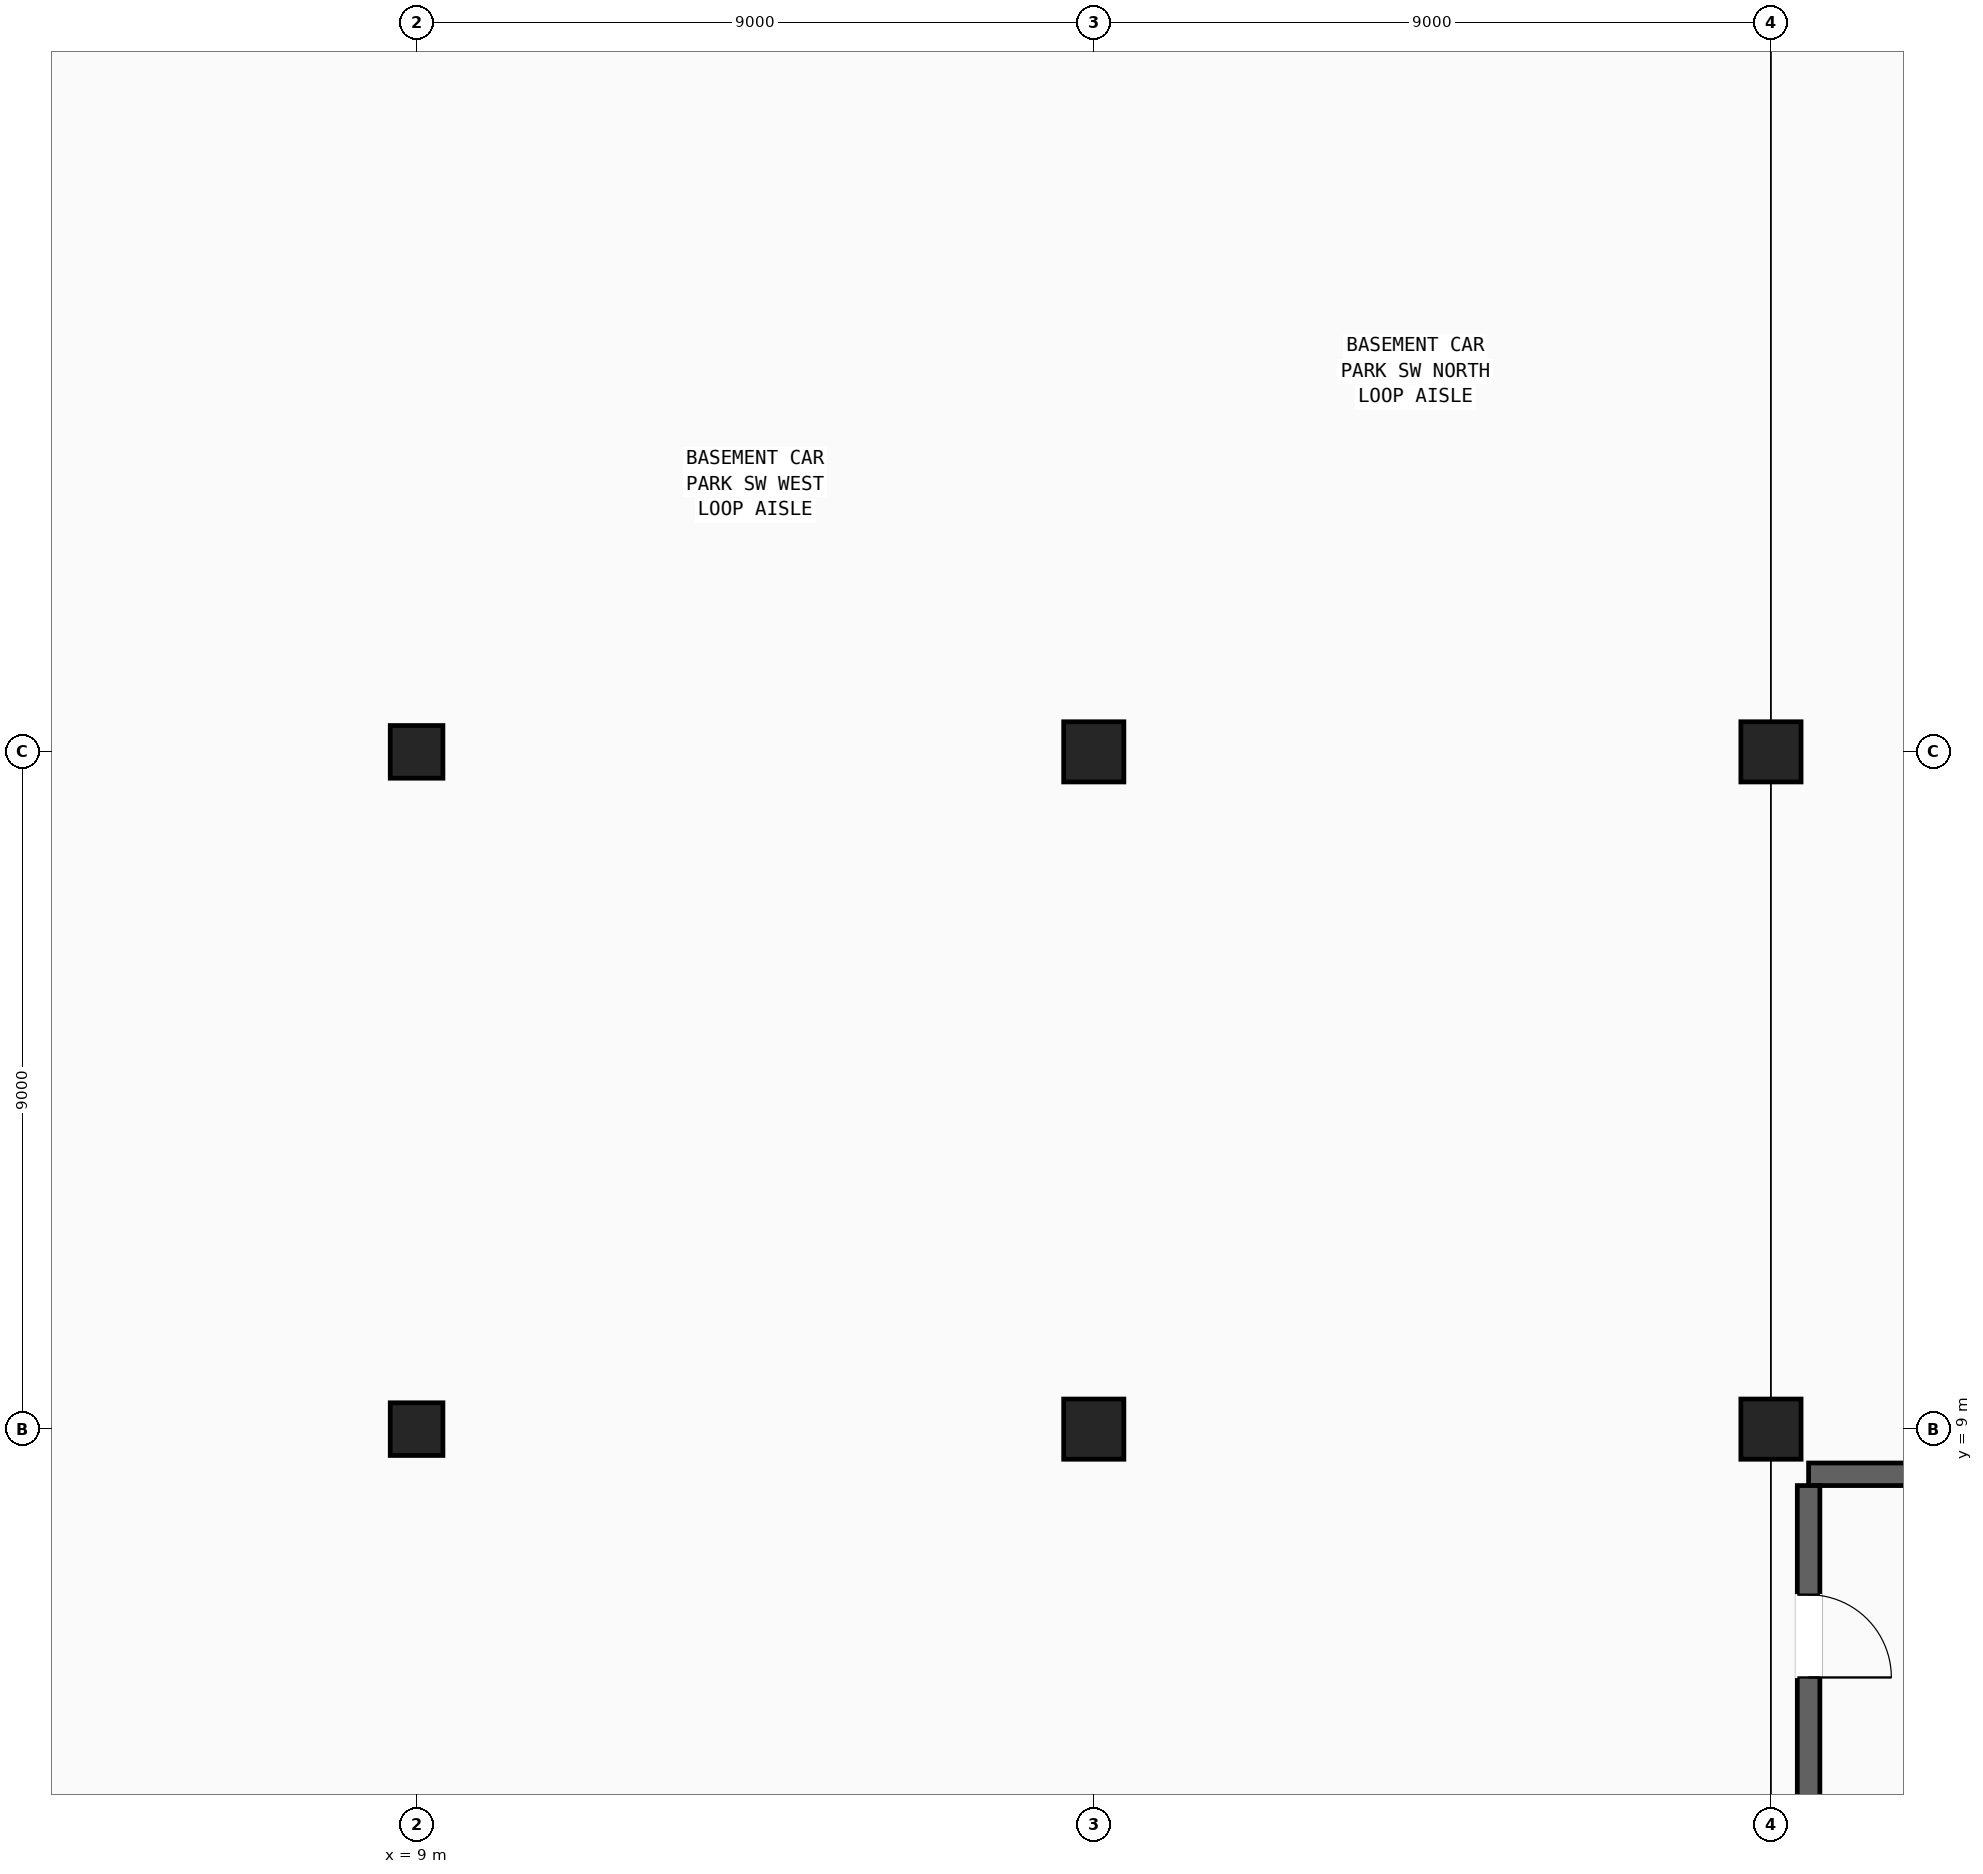
"""IFC4 building model, lengths in metres.
Left out: names, types, materials, properties, quantities, classifications, styles, units other than length and angle.
Written with IfcOpenShell. Run it as: python <this file> out.ifc"""

import sys

from ifc_helpers import new_model, si_unit, direction, frame, frame_2d, origin, origin_2d, place, context, subcontext, project, spatial, rectangle, extrude, element, fill, save


model = new_model("IFC4")
c1 = context("Model", 3, precision=1e-05, world=origin(), true_north=direction((0.0, 1.0)))
c2 = subcontext(c1, "Body", "Model", "MODEL_VIEW")
j1 = project(units=[si_unit("LENGTHUNIT", "METRE"), si_unit("PLANEANGLEUNIT", "RADIAN")], contexts=[c1])
p1 = place(None, origin())
s1 = spatial("IfcSite", under=j1, at=p1, CompositionType="ELEMENT")
p2 = place(p1, origin())
s2 = spatial("IfcBuilding", under=s1, at=p2, CompositionType="ELEMENT")
p3 = place(p2, frame((0.0, 0.0, -5.1)))
s3 = spatial("IfcBuildingStorey", under=s2, at=p3, CompositionType="ELEMENT", Elevation=-5.1)
for number, where, z_axis, x_axis in (
    (1, (9.0, 9.0, 0.0), (0.0, 0.0, 1.0), (1.0, 0.0, 0.0)),
    (2, (9.0, 18.0, 0.0), (0.0, 0.0, 1.0), (1.0, 0.0, 0.0)),
):
    element("IfcColumn", number, at=place(p3, frame(where, z_axis=z_axis, x_axis=x_axis)), inside=s3, PredefinedType="COLUMN", context=c2, shape_type="SweptSolid", body=[
        extrude(rectangle(XDim=0.7, YDim=0.7, at=origin_2d()), origin(), (0.0, 0.0, 1.0), 5.1),
    ])
for number, where, z_axis, x_axis in (
    (3, (18.0, 9.0, 0.0), (0.0, 0.0, 1.0), (1.0, 0.0, 0.0)),
    (4, (18.0, 18.0, 0.0), (0.0, 0.0, 1.0), (1.0, 0.0, 0.0)),
    (5, (27.0, 9.0, 0.0), (0.0, 0.0, 1.0), (1.0, 0.0, 0.0)),
    (6, (27.0, 18.0, 0.0), (0.0, 0.0, 1.0), (1.0, 0.0, 0.0)),
):
    element("IfcColumn", number, at=place(p3, frame(where, z_axis=z_axis, x_axis=x_axis)), inside=s3, PredefinedType="COLUMN", context=c2, shape_type="SweptSolid", body=[
        extrude(rectangle(XDim=0.8, YDim=0.8, at=origin_2d()), origin(), (0.0, 0.0, 1.0), 5.1),
    ])
p4 = place(p3, frame((27.5, 8.4, 0.0), z_axis=(0.0, 0.0, 1.0), x_axis=(1.0, 0.0, 0.0)))
e7 = element("IfcWall", 7, at=p4, inside=s3, PredefinedType="SHEAR", context=c2, shape_type="SweptSolid", body=[
    extrude(rectangle(XDim=10.3, YDim=0.3, at=frame_2d((5.15, 0.0))), origin(), (0.0, 0.0, 1.0), 5.1),
])
p5 = place(p3, frame((27.5, 3.15, 0.0), z_axis=(0.0, 0.0, 1.0), x_axis=(0.0, 1.0, 0.0)))
e8 = element("IfcWall", 8, at=p5, inside=s3, PredefinedType="SHEAR", context=c2, shape_type="SweptSolid", body=[
    extrude(rectangle(XDim=5.1, YDim=0.3, at=frame_2d((2.55, 0.0))), origin(), (0.0, 0.0, 1.0), 5.1),
])
p6 = place(p5, frame((2.55, 0.0, 0.0)))
e9 = element("IfcOpeningElement", 9, at=p6, cuts=e8, PredefinedType="OPENING", context=c2, shape_type="SweptSolid", body=[
    extrude(rectangle(XDim=1.1, YDim=2.2, at=frame_2d((0.55, 1.1))), frame((0.0, 0.16, 0.0), z_axis=(0.0, -1.0, 0.0), x_axis=(1.0, 0.0, 0.0)), (0.0, 0.0, 1.0), 0.32),
])
p7 = place(p6, frame((1.1, 0.0, 0.0), z_axis=(0.0, 0.0, 1.0), x_axis=(-1.0, 0.0, 0.0)))
e10 = element("IfcDoor", 10, at=p7, inside=s3, OperationType="SINGLE_SWING_RIGHT", PredefinedType="DOOR", context=c2, shape_type="SweptSolid", body=[
    extrude(rectangle(XDim=1.1, YDim=2.2, at=frame_2d((0.55, 1.1))), frame((0.0, 0.025, 0.0), z_axis=(0.0, -1.0, 0.0), x_axis=(1.0, 0.0, 0.0)), (0.0, 0.0, 1.0), 0.05),
])
fill(e9, e10)
save(model, sys.argv[1])
